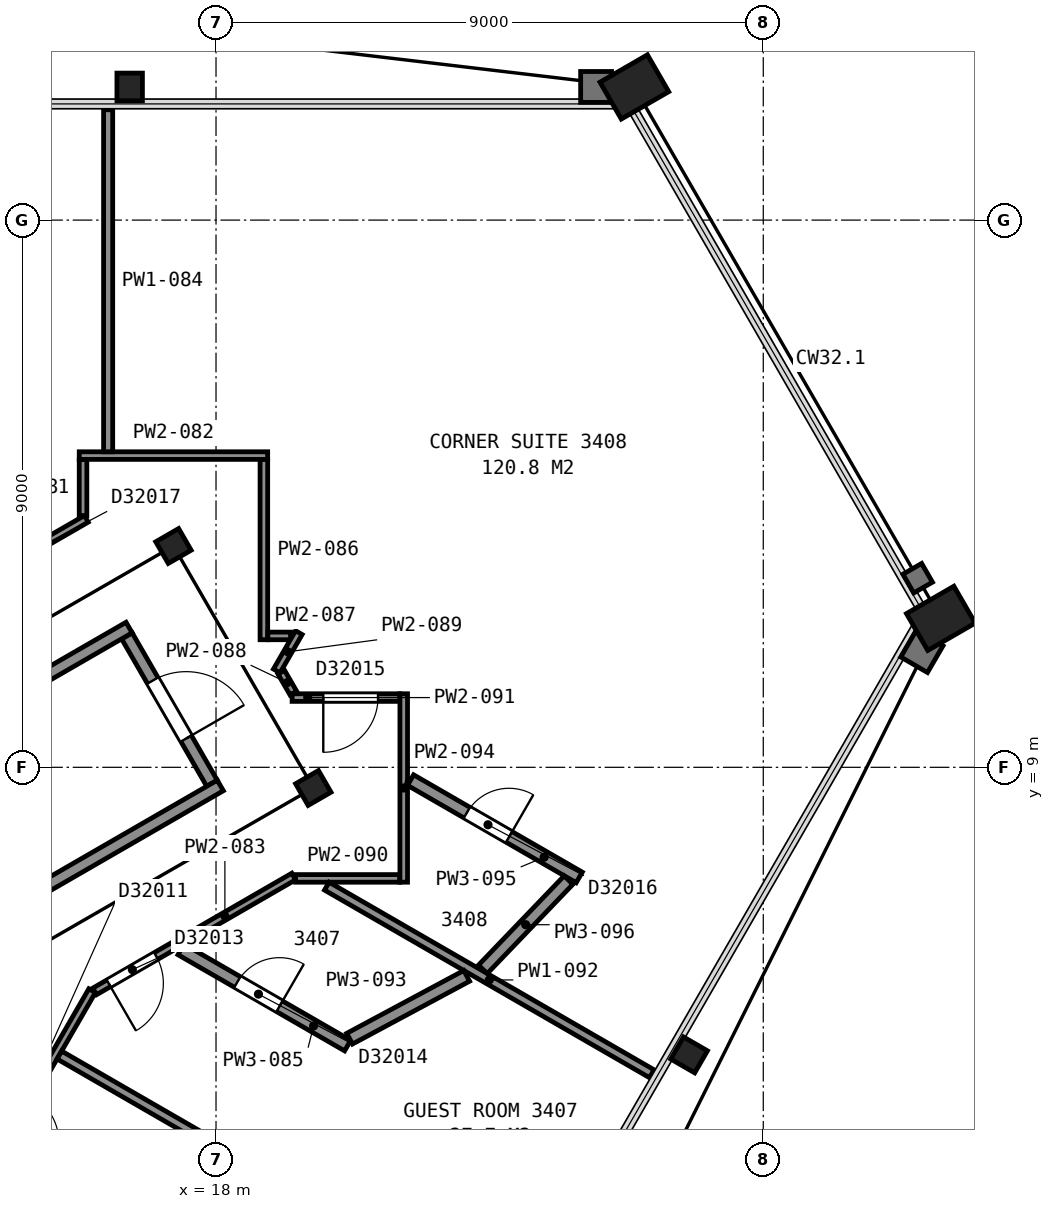
"""IFC4 building model, lengths in metres.
Left out: names, types, materials, properties, quantities, classifications, styles, units other than length and angle.
Written with IfcOpenShell. Run it as: python <this file> out.ifc"""

import sys

from ifc_helpers import new_model, si_unit, direction, frame, frame_2d, origin, origin_2d, place, context, subcontext, project, spatial, rectangle, hollow_rectangle, i_section, extrude, element, fill, save


model = new_model("IFC4")
c1 = context("Model", 3, precision=1e-05, world=origin(), true_north=direction((0.0, 1.0)))
c2 = subcontext(c1, "Body", "Model", "MODEL_VIEW")
j1 = project(units=[si_unit("LENGTHUNIT", "METRE"), si_unit("PLANEANGLEUNIT", "RADIAN")], contexts=[c1])
p1 = place(None, origin())
s1 = spatial("IfcSite", under=j1, at=p1, CompositionType="ELEMENT")
p2 = place(p1, origin())
s2 = spatial("IfcBuilding", under=s1, at=p2, CompositionType="ELEMENT")
p3 = place(p2, frame((0.0, 0.0, 139.6)))
s3 = spatial("IfcBuildingStorey", under=s2, at=p3, CompositionType="ELEMENT", Elevation=139.6)
p4 = place(p3, frame((24.88, 20.19, 0.0), z_axis=(0.0, 0.0, 1.0), x_axis=(0.5, -0.866025403784, 0.0)))
e1 = element("IfcColumn", 1, at=p4, inside=s3, PredefinedType="COLUMN", context=c2, shape_type="SweptSolid", body=[
    extrude(hollow_rectangle(XDim=0.7, YDim=0.9, WallThickness=0.065, at=origin_2d()), origin(), (0.0, 0.0, 1.0), 3.6),
])
for number, where, z_axis, x_axis in (
    (2, (16.58, 20.19, 0.0), (0.0, 0.0, 1.0), (1.0, 0.0, 0.0)),
    (3, (25.78, 4.27, 0.0), (0.0, 0.0, 1.0), (-0.5, -0.866, 0.0)),
):
    element("IfcColumn", number, at=place(p3, frame(where, z_axis=z_axis, x_axis=x_axis)), inside=s3, PredefinedType="COLUMN", context=c2, shape_type="SweptSolid", body=[
        extrude(i_section(OverallWidth=0.419, OverallDepth=0.455, WebThickness=0.042, FlangeThickness=0.068, FilletRadius=0.015, at=origin_2d()), origin(), (0.0, 0.0, 1.0), 2.87),
    ])
p5 = place(p3, frame((29.92, 11.45, 0.0), z_axis=(0.0, 0.0, 1.0), x_axis=(0.5, -0.866025403784, 0.0)))
e4 = element("IfcColumn", 4, at=p5, inside=s3, PredefinedType="COLUMN", context=c2, shape_type="SweptSolid", body=[
    extrude(hollow_rectangle(XDim=0.7, YDim=0.9, WallThickness=0.065, at=origin_2d()), origin(), (0.0, 0.0, 1.0), 3.6),
])
for number, where, z_axis, x_axis in (
    (5, (19.6, 8.66, 0.0), (0.0, 0.0, 1.0), (0.5, -0.866, 0.0)),
    (6, (17.3, 12.64, 0.0), (0.0, 0.0, 1.0), (0.5, -0.866, 0.0)),
):
    element("IfcColumn", number, at=place(p3, frame(where, z_axis=z_axis, x_axis=x_axis)), inside=s3, PredefinedType="COLUMN", context=c2, shape_type="SweptSolid", body=[
        extrude(i_section(OverallWidth=0.411, OverallDepth=0.434, WebThickness=0.036, FlangeThickness=0.057, FilletRadius=0.015, at=origin_2d()), origin(), (0.0, 0.0, 1.0), 3.545),
    ])
p6 = place(p3, frame((17.934, 8.738, 0.0), z_axis=(0.0, 0.0, 1.0), x_axis=(-0.49998411664, 0.866034573852, 0.0)))
e7 = element("IfcWall", 7, at=p6, inside=s3, PredefinedType="PARTITIONING", context=c2, shape_type="SweptSolid", body=[
    extrude(rectangle(XDim=2.8, YDim=0.2, at=frame_2d((1.4, 0.0))), origin(), (0.0, 0.0, 1.0), 3.35),
])
p7 = place(p6, frame((0.85, 0.0, 0.0)))
e8 = element("IfcOpeningElement", 8, at=p7, cuts=e7, PredefinedType="OPENING", context=c2, shape_type="SweptSolid", body=[
    extrude(rectangle(XDim=1.1, YDim=2.1, at=frame_2d((0.55, 1.05))), frame((0.0, 0.11, 0.0), z_axis=(0.0, -1.0, 0.0), x_axis=(1.0, 0.0, 0.0)), (0.0, 0.0, 1.0), 0.22),
])
for number, where, z_axis, x_axis in (
    (9, (6.178, 5.299, 0.0), (0.0, 0.0, 1.0), (0.866, 0.5, 0.0)),
    (10, (7.678, 2.701, 0.0), (0.0, 0.0, 1.0), (0.866, 0.5, 0.0)),
):
    element("IfcWall", number, at=place(p3, frame(where, z_axis=z_axis, x_axis=x_axis)), inside=s3, PredefinedType="PARTITIONING", context=c2, shape_type="SweptSolid", body=[
        extrude(rectangle(XDim=12.0, YDim=0.2, at=frame_2d((6.0, 0.0))), origin(), (0.0, 0.0, 1.0), 3.35),
    ])
p8 = place(p3, frame((15.962, 5.326, 0.0), z_axis=(0.0, 0.0, 1.0), x_axis=(-0.499992829944, -0.866029543379, 0.0)))
e11 = element("IfcWall", 11, at=p8, inside=s3, PredefinedType="PARTITIONING", context=c2, shape_type="SweptSolid", body=[
    extrude(rectangle(XDim=24.413, YDim=0.125, at=frame_2d((12.207, 0.0))), origin(), (0.0, 0.0, 1.0), 2.262),
])
p9 = place(p8, frame((21.258, 0.0, 0.0)))
e12 = element("IfcOpeningElement", 12, at=p9, cuts=e11, PredefinedType="OPENING", context=c2, shape_type="SweptSolid", body=[
    extrude(rectangle(XDim=0.9, YDim=2.1, at=frame_2d((0.45, 1.05))), frame((0.0, 0.073, 0.0), z_axis=(0.0, -1.0, 0.0), x_axis=(1.0, 0.0, 0.0)), (0.0, 0.0, 1.0), 0.145),
])
p10 = place(p8, frame((18.502, 0.0, 0.0)))
e13 = element("IfcOpeningElement", 13, at=p10, cuts=e11, PredefinedType="OPENING", context=c2, shape_type="SweptSolid", body=[
    extrude(rectangle(XDim=0.9, YDim=2.1, at=frame_2d((0.45, 1.05))), frame((0.0, 0.073, 0.0), z_axis=(0.0, -1.0, 0.0), x_axis=(1.0, 0.0, 0.0)), (0.0, 0.0, 1.0), 0.145),
])
p11 = place(p8, frame((11.799, 0.0, 0.0)))
e14 = element("IfcOpeningElement", 14, at=p11, cuts=e11, PredefinedType="OPENING", context=c2, shape_type="SweptSolid", body=[
    extrude(rectangle(XDim=0.9, YDim=2.1, at=frame_2d((0.45, 1.05))), frame((0.0, 0.073, 0.0), z_axis=(0.0, -1.0, 0.0), x_axis=(1.0, 0.0, 0.0)), (0.0, 0.0, 1.0), 0.145),
])
p12 = place(p8, frame((9.043, 0.0, 0.0)))
e15 = element("IfcOpeningElement", 15, at=p12, cuts=e11, PredefinedType="OPENING", context=c2, shape_type="SweptSolid", body=[
    extrude(rectangle(XDim=0.9, YDim=2.1, at=frame_2d((0.45, 1.05))), frame((0.0, 0.073, 0.0), z_axis=(0.0, -1.0, 0.0), x_axis=(1.0, 0.0, 0.0)), (0.0, 0.0, 1.0), 0.145),
])
p13 = place(p8, frame((1.99, 0.0, 0.0)))
e16 = element("IfcOpeningElement", 16, at=p13, cuts=e11, PredefinedType="OPENING", context=c2, shape_type="SweptSolid", body=[
    extrude(rectangle(XDim=0.9, YDim=2.1, at=frame_2d((0.45, 1.05))), frame((0.0, 0.073, 0.0), z_axis=(0.0, -1.0, 0.0), x_axis=(1.0, 0.0, 0.0)), (0.0, 0.0, 1.0), 0.145),
])
p14 = place(p3, frame((12.605, 11.203, 0.0), z_axis=(0.0, 0.0, 1.0), x_axis=(0.866113281362, 0.499847760672, 0.0)))
e17 = element("IfcWall", 17, at=p14, inside=s3, PredefinedType="PARTITIONING", context=c2, shape_type="SweptSolid", body=[
    extrude(rectangle(XDim=3.767, YDim=0.125, at=frame_2d((1.883, 0.0))), origin(), (0.0, 0.0, 1.0), 2.262),
])
p15 = place(p14, frame((1.89, 0.0, 0.0)))
e18 = element("IfcOpeningElement", 18, at=p15, cuts=e17, PredefinedType="OPENING", context=c2, shape_type="SweptSolid", body=[
    extrude(rectangle(XDim=0.9, YDim=2.1, at=frame_2d((0.45, 1.05))), frame((0.0, 0.073, 0.0), z_axis=(0.0, -1.0, 0.0), x_axis=(1.0, 0.0, 0.0)), (0.0, 0.0, 1.0), 0.145),
])
p16 = place(p3, frame((15.424, 4.268, 0.0), z_axis=(0.0, 0.0, 1.0), x_axis=(0.866022320763, -0.500005339912, 0.0)))
e19 = element("IfcWall", 19, at=p16, inside=s3, PredefinedType="PARTITIONING", context=c2, shape_type="SweptSolid", body=[
    extrude(rectangle(XDim=8.591, YDim=0.15, at=frame_2d((4.296, 0.0))), origin(), (0.0, 0.0, 1.0), 2.262),
])
p17 = place(p3, frame((15.813, 13.14, 0.0), z_axis=(0.0, 0.0, 1.0), x_axis=(0.0, 1.0, 0.0)))
e20 = element("IfcWall", 20, at=p17, inside=s3, PredefinedType="PARTITIONING", context=c2, shape_type="SweptSolid", body=[
    extrude(rectangle(XDim=0.922, YDim=0.125, at=frame_2d((0.461, 0.0))), origin(), (0.0, 0.0, 1.0), 2.262),
])
p18 = place(p3, frame((15.75, 14.127, 0.0), z_axis=(0.0, 0.0, 1.0), x_axis=(1.0, 0.0, 0.0)))
e21 = element("IfcWall", 21, at=p18, inside=s3, PredefinedType="PARTITIONING", context=c2, shape_type="SweptSolid", body=[
    extrude(rectangle(XDim=3.099, YDim=0.125, at=frame_2d((1.55, 0.0))), origin(), (0.0, 0.0, 1.0), 2.262),
])
p19 = place(p3, frame((19.278, 7.204, 0.0), z_axis=(0.0, 0.0, 1.0), x_axis=(-0.866028547684, -0.499994554566, 0.0)))
e22 = element("IfcWall", 22, at=p19, inside=s3, PredefinedType="PARTITIONING", context=c2, shape_type="SweptSolid", body=[
    extrude(rectangle(XDim=3.78, YDim=0.125, at=frame_2d((1.89, 0.0))), origin(), (0.0, 0.0, 1.0), 2.262),
])
p20 = place(p19, frame((2.615, 0.0, 0.0)))
e23 = element("IfcOpeningElement", 23, at=p20, cuts=e22, PredefinedType="OPENING", context=c2, shape_type="SweptSolid", body=[
    extrude(rectangle(XDim=0.9, YDim=2.1, at=frame_2d((0.45, 1.05))), frame((0.0, 0.073, 0.0), z_axis=(0.0, -1.0, 0.0), x_axis=(1.0, 0.0, 0.0)), (0.0, 0.0, 1.0), 0.145),
])
p21 = place(p3, frame((16.226, 14.189, 0.0), z_axis=(0.0, 0.0, 1.0), x_axis=(0.0, 1.0, 0.0)))
e24 = element("IfcWall", 24, at=p21, inside=s3, PredefinedType="PARTITIONING", context=c2, shape_type="SweptSolid", body=[
    extrude(rectangle(XDim=5.625, YDim=0.15, at=frame_2d((2.813, 0.0))), origin(), (0.0, 0.0, 1.0), 2.262),
])
p22 = place(p3, frame((17.425, 6.004, 0.0), z_axis=(0.0, 0.0, 1.0), x_axis=(0.866145753309, -0.499791490549, 0.0)))
e25 = element("IfcWall", 25, at=p22, inside=s3, PredefinedType="PARTITIONING", context=c2, shape_type="SweptSolid", body=[
    extrude(rectangle(XDim=3.163, YDim=0.2, at=frame_2d((1.582, 0.0))), origin(), (0.0, 0.0, 1.0), 2.262),
])
p23 = place(p22, frame((1.07, 0.0, 0.0)))
e26 = element("IfcOpeningElement", 26, at=p23, cuts=e25, PredefinedType="OPENING", context=c2, shape_type="SweptSolid", body=[
    extrude(rectangle(XDim=0.8, YDim=2.1, at=frame_2d((0.4, 1.05))), frame((0.0, 0.11, 0.0), z_axis=(0.0, -1.0, 0.0), x_axis=(1.0, 0.0, 0.0)), (0.0, 0.0, 1.0), 0.22),
])
p24 = place(p3, frame((18.787, 11.098, 0.0), z_axis=(0.0, 0.0, 1.0), x_axis=(0.0, 1.0, 0.0)))
e27 = element("IfcWall", 27, at=p24, inside=s3, PredefinedType="PARTITIONING", context=c2, shape_type="SweptSolid", body=[
    extrude(rectangle(XDim=2.964, YDim=0.125, at=frame_2d((1.482, 0.0))), origin(), (0.0, 0.0, 1.0), 2.262),
])
p25 = place(p3, frame((18.852, 11.161, 0.0), z_axis=(0.0, 0.0, 1.0), x_axis=(1.0, 0.0, 0.0)))
e28 = element("IfcWall", 28, at=p25, inside=s3, PredefinedType="PARTITIONING", context=c2, shape_type="SweptSolid", body=[
    extrude(rectangle(XDim=0.374, YDim=0.125, at=frame_2d((0.187, 0.0))), origin(), (0.0, 0.0, 1.0), 2.262),
])
p26 = place(p3, frame((19.073, 10.565, 0.0), z_axis=(0.0, 0.0, 1.0), x_axis=(0.499899443193, -0.866083452501, 0.0)))
e29 = element("IfcWall", 29, at=p26, inside=s3, PredefinedType="PARTITIONING", context=c2, shape_type="SweptSolid", body=[
    extrude(rectangle(XDim=0.398, YDim=0.125, at=frame_2d((0.199, 0.0))), origin(), (0.0, 0.0, 1.0), 2.262),
])
p27 = place(p3, frame((18.999, 10.585, 0.0), z_axis=(0.0, 0.0, 1.0), x_axis=(0.499712769023, 0.866191173169, 0.0)))
e30 = element("IfcWall", 30, at=p27, inside=s3, PredefinedType="PARTITIONING", context=c2, shape_type="SweptSolid", body=[
    extrude(rectangle(XDim=0.728, YDim=0.125, at=frame_2d((0.364, 0.0))), origin(), (0.0, 0.0, 1.0), 2.262),
])
p28 = place(p3, frame((19.309, 7.173, 0.0), z_axis=(0.0, 0.0, 1.0), x_axis=(1.0, 0.0, 0.0)))
e31 = element("IfcWall", 31, at=p28, inside=s3, PredefinedType="PARTITIONING", context=c2, shape_type="SweptSolid", body=[
    extrude(rectangle(XDim=1.713, YDim=0.125, at=frame_2d((0.856, 0.0))), origin(), (0.0, 0.0, 1.0), 2.262),
])
p29 = place(p3, frame((19.251, 10.147, 0.0), z_axis=(0.0, 0.0, 1.0), x_axis=(1.0, 0.0, 0.0)))
e32 = element("IfcWall", 32, at=p29, inside=s3, PredefinedType="PARTITIONING", context=c2, shape_type="SweptSolid", body=[
    extrude(rectangle(XDim=1.771, YDim=0.125, at=frame_2d((0.885, 0.0))), origin(), (0.0, 0.0, 1.0), 2.262),
])
p30 = place(p29, frame((0.512, 0.0, 0.0)))
e33 = element("IfcOpeningElement", 33, at=p30, cuts=e32, PredefinedType="OPENING", context=c2, shape_type="SweptSolid", body=[
    extrude(rectangle(XDim=0.9, YDim=2.1, at=frame_2d((0.45, 1.05))), frame((0.0, 0.073, 0.0), z_axis=(0.0, -1.0, 0.0), x_axis=(1.0, 0.0, 0.0)), (0.0, 0.0, 1.0), 0.145),
])
p31 = place(p3, frame((19.822, 7.046, 0.0), z_axis=(0.0, 0.0, 1.0), x_axis=(0.866041323853, -0.499972424619, 0.0)))
e34 = element("IfcWall", 34, at=p31, inside=s3, PredefinedType="PARTITIONING", context=c2, shape_type="SweptSolid", body=[
    extrude(rectangle(XDim=6.172, YDim=0.15, at=frame_2d((3.086, 0.0))), origin(), (0.0, 0.0, 1.0), 2.262),
])
p32 = place(p3, frame((20.197, 4.537, 0.0), z_axis=(0.0, 0.0, 1.0), x_axis=(0.881162538645, 0.472813473253, 0.0)))
e35 = element("IfcWall", 35, at=p32, inside=s3, PredefinedType="PARTITIONING", context=c2, shape_type="SweptSolid", body=[
    extrude(rectangle(XDim=2.185, YDim=0.2, at=frame_2d((1.093, 0.0))), origin(), (0.0, 0.0, 1.0), 2.262),
])
p33 = place(p3, frame((21.087, 7.111, 0.0), z_axis=(0.0, 0.0, 1.0), x_axis=(0.0, 1.0, 0.0)))
e36 = element("IfcWall", 36, at=p33, inside=s3, PredefinedType="PARTITIONING", context=c2, shape_type="SweptSolid", body=[
    extrude(rectangle(XDim=3.099, YDim=0.125, at=frame_2d((1.549, 0.0))), origin(), (0.0, 0.0, 1.0), 2.262),
])
p34 = place(p3, frame((23.974, 7.189, 0.0), z_axis=(0.0, 0.0, 1.0), x_axis=(-0.866105631149, 0.499861016376, 0.0)))
e37 = element("IfcWall", 37, at=p34, inside=s3, PredefinedType="PARTITIONING", context=c2, shape_type="SweptSolid", body=[
    extrude(rectangle(XDim=3.203, YDim=0.2, at=frame_2d((1.602, 0.0))), origin(), (0.0, 0.0, 1.0), 2.262),
])
p35 = place(p34, frame((1.333, 0.0, 0.0)))
e38 = element("IfcOpeningElement", 38, at=p35, cuts=e37, PredefinedType="OPENING", context=c2, shape_type="SweptSolid", body=[
    extrude(rectangle(XDim=0.8, YDim=2.1, at=frame_2d((0.4, 1.05))), frame((0.0, 0.11, 0.0), z_axis=(0.0, -1.0, 0.0), x_axis=(1.0, 0.0, 0.0)), (0.0, 0.0, 1.0), 0.22),
])
p36 = place(p3, frame((22.388, 5.677, 0.0), z_axis=(0.0, 0.0, 1.0), x_axis=(0.692374421384, 0.721538398572, 0.0)))
e39 = element("IfcWall", 39, at=p36, inside=s3, PredefinedType="PARTITIONING", context=c2, shape_type="SweptSolid", body=[
    extrude(rectangle(XDim=2.034, YDim=0.2, at=frame_2d((1.017, 0.0))), origin(), (0.0, 0.0, 1.0), 2.262),
])
p37 = place(p7, origin())
e40 = element("IfcDoor", 40, at=p37, inside=s3, OperationType="SINGLE_SWING_LEFT", PredefinedType="DOOR", context=c2, shape_type="SweptSolid", body=[
    extrude(rectangle(XDim=1.1, YDim=2.1, at=frame_2d((0.55, 1.05))), frame((0.0, 0.025, 0.0), z_axis=(0.0, -1.0, 0.0), x_axis=(1.0, 0.0, 0.0)), (0.0, 0.0, 1.0), 0.05),
])
fill(e8, e40)
p38 = place(p20, origin())
e41 = element("IfcDoor", 41, at=p38, inside=s3, OperationType="SINGLE_SWING_RIGHT", PredefinedType="DOOR", context=c2, shape_type="SweptSolid", body=[
    extrude(rectangle(XDim=0.9, YDim=2.1, at=frame_2d((0.45, 1.05))), frame((0.0, 0.025, 0.0), z_axis=(0.0, -1.0, 0.0), x_axis=(1.0, 0.0, 0.0)), (0.0, 0.0, 1.0), 0.05),
])
fill(e23, e41)
p39 = place(p23, origin())
e42 = element("IfcDoor", 42, at=p39, inside=s3, OperationType="SINGLE_SWING_RIGHT", PredefinedType="DOOR", context=c2, shape_type="SweptSolid", body=[
    extrude(rectangle(XDim=0.8, YDim=2.1, at=frame_2d((0.4, 1.05))), frame((0.0, 0.025, 0.0), z_axis=(0.0, -1.0, 0.0), x_axis=(1.0, 0.0, 0.0)), (0.0, 0.0, 1.0), 0.05),
])
fill(e26, e42)
p40 = place(p30, origin())
e43 = element("IfcDoor", 43, at=p40, inside=s3, OperationType="SINGLE_SWING_LEFT", PredefinedType="DOOR", context=c2, shape_type="SweptSolid", body=[
    extrude(rectangle(XDim=0.9, YDim=2.1, at=frame_2d((0.45, 1.05))), frame((0.0, 0.025, 0.0), z_axis=(0.0, -1.0, 0.0), x_axis=(1.0, 0.0, 0.0)), (0.0, 0.0, 1.0), 0.05),
])
fill(e33, e43)
p41 = place(p35, origin())
e44 = element("IfcDoor", 44, at=p41, inside=s3, OperationType="SINGLE_SWING_LEFT", PredefinedType="DOOR", context=c2, shape_type="SweptSolid", body=[
    extrude(rectangle(XDim=0.8, YDim=2.1, at=frame_2d((0.4, 1.05))), frame((0.0, 0.025, 0.0), z_axis=(0.0, -1.0, 0.0), x_axis=(1.0, 0.0, 0.0)), (0.0, 0.0, 1.0), 0.05),
])
fill(e38, e44)
save(model, sys.argv[1])
